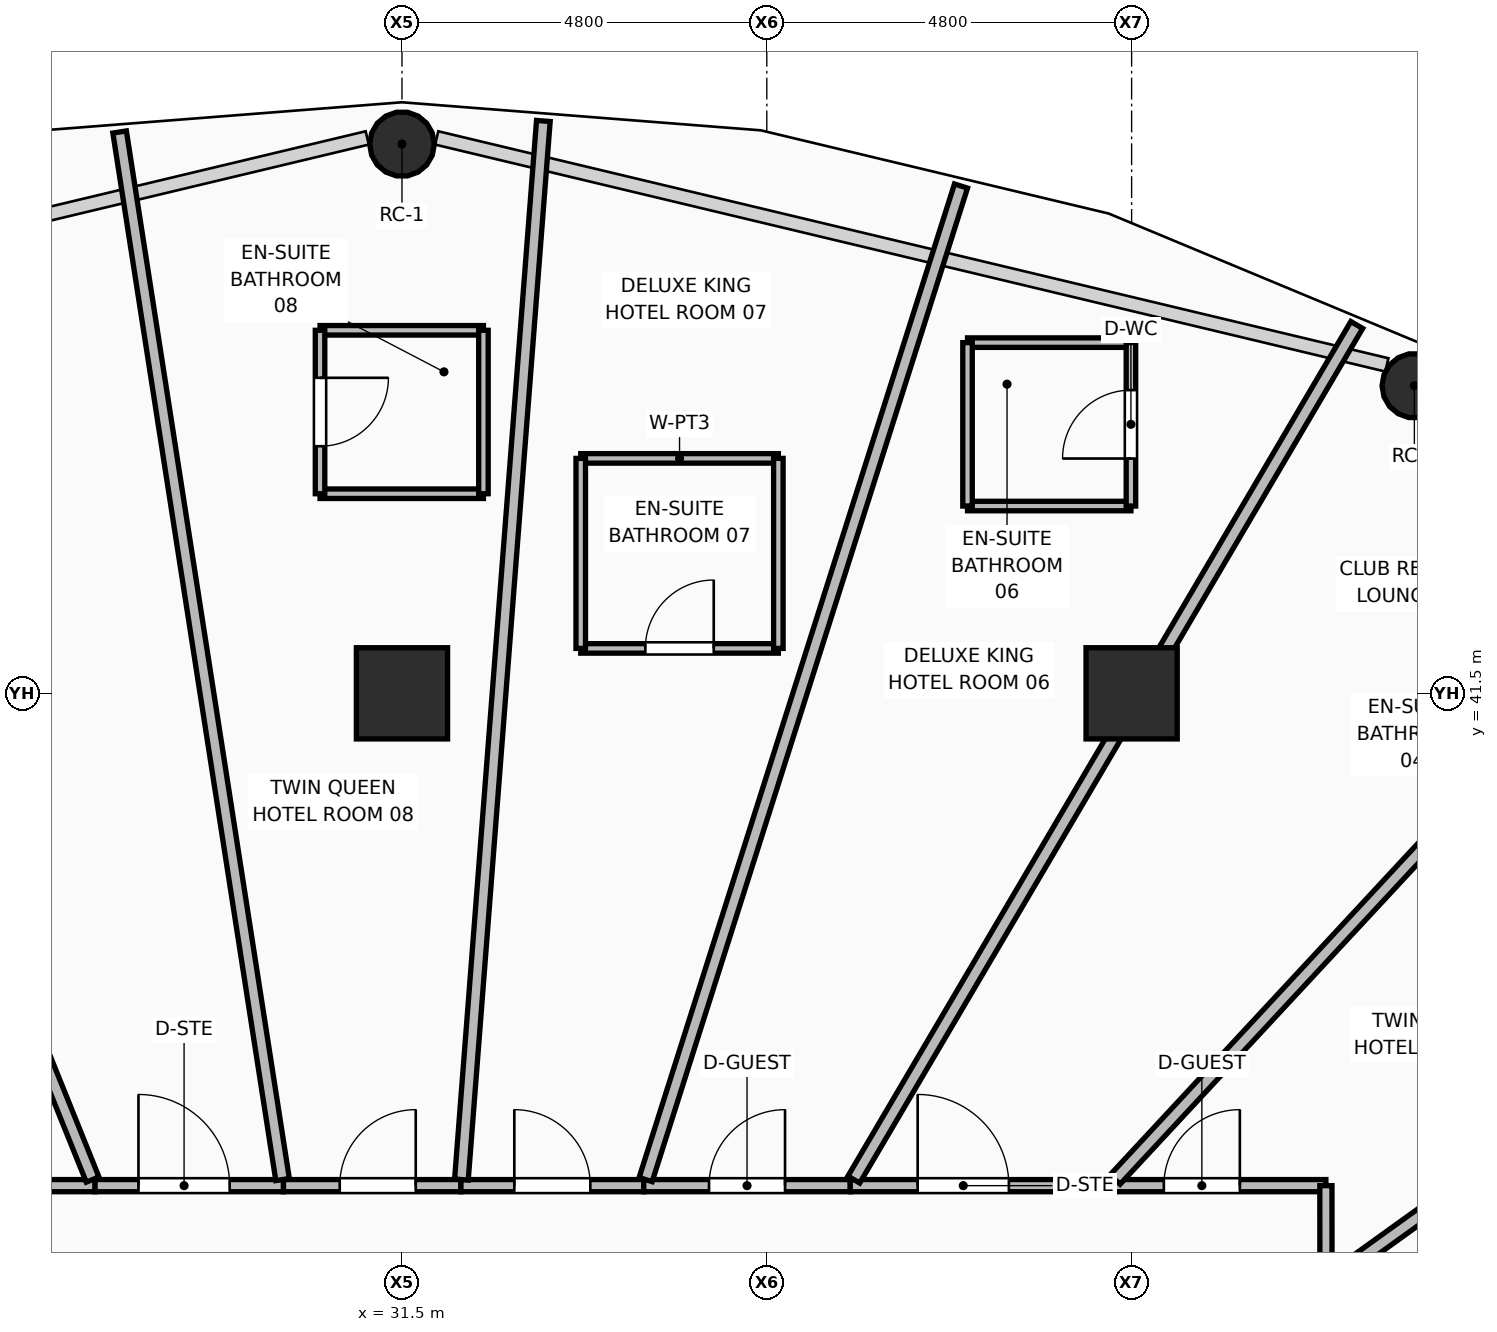
"""IFC4 building model, lengths in metres.
Left out: names, types, materials, properties, quantities, classifications, styles, units other than length and angle.
Written with IfcOpenShell. Run it as: python <this file> out.ifc"""

import sys

from ifc_helpers import new_model, si_unit, direction, frame, frame_2d, origin, origin_2d, place, context, subcontext, project, spatial, rectangle, hollow_rectangle, hollow_circle, extrude, element, fill, save


model = new_model("IFC4")
c1 = context("Model", 3, precision=1e-05, world=origin(), true_north=direction((0.0, 1.0)))
c2 = subcontext(c1, "Body", "Model", "MODEL_VIEW")
j1 = project(units=[si_unit("LENGTHUNIT", "METRE"), si_unit("PLANEANGLEUNIT", "RADIAN")], contexts=[c1])
p1 = place(None, origin())
s1 = spatial("IfcSite", under=j1, at=p1, CompositionType="ELEMENT")
p2 = place(p1, origin())
s2 = spatial("IfcBuilding", under=s1, at=p2, CompositionType="ELEMENT")
p3 = place(p2, frame((0.0, 0.0, 53.25)))
s3 = spatial("IfcBuildingStorey", under=s2, at=p3, CompositionType="ELEMENT", Elevation=53.25)
for number, where, z_axis, x_axis in (
    (1, (31.5, 41.5, 0.0), (0.0, 0.0, 1.0), (1.0, 0.0, 0.0)),
    (2, (41.1, 41.5, 0.0), (0.0, 0.0, 1.0), (1.0, 0.0, 0.0)),
):
    element("IfcColumn", number, at=place(p3, frame(where, z_axis=z_axis, x_axis=x_axis)), inside=s3, PredefinedType="COLUMN", context=c2, shape_type="SweptSolid", body=[
        extrude(hollow_rectangle(XDim=1.2, YDim=1.2, WallThickness=0.045, at=origin_2d()), origin(), (0.0, 0.0, 1.0), 3.75),
    ])
p4 = place(p3, frame((44.82, 45.547, 0.0), z_axis=(0.111309599924, 0.172151708361, 0.978761442985), x_axis=(-0.839754063035, 0.542966954443, 0.0)))
e3 = element("IfcColumn", 3, at=p4, inside=s3, PredefinedType="COLUMN", context=c2, shape_type="SweptSolid", body=[
    extrude(hollow_circle(Radius=0.425, WallThickness=0.04, at=origin_2d()), origin(), (0.0, 0.0, 1.0), 3.647),
])
p5 = place(p3, frame((31.5, 48.726, 0.0), z_axis=(0.0, 0.198976453548, 0.980004270875), x_axis=(-1.0, 0.0, 0.0)))
e4 = element("IfcColumn", 4, at=p5, inside=s3, PredefinedType="COLUMN", context=c2, shape_type="SweptSolid", body=[
    extrude(hollow_circle(Radius=0.425, WallThickness=0.04, at=origin_2d()), origin(), (0.0, 0.0, 1.0), 3.643),
])
p6 = place(p3, frame((24.568, 35.023, 0.0), z_axis=(0.0, 0.0, 1.0), x_axis=(1.0, 0.0, 0.0)))
e5 = element("IfcWall", 5, at=p6, inside=s3, PredefinedType="PARTITIONING", context=c2, shape_type="SweptSolid", body=[
    extrude(rectangle(XDim=2.894, YDim=0.16, at=frame_2d((1.447, 0.0))), origin(), (0.0, 0.0, 1.0), 3.55),
])
p7 = place(p6, frame((0.847, 0.0, 0.0)))
e6 = element("IfcOpeningElement", 6, at=p7, cuts=e5, PredefinedType="OPENING", context=c2, shape_type="SweptSolid", body=[
    extrude(rectangle(XDim=1.2, YDim=2.1, at=frame_2d((0.6, 1.05))), frame((0.0, 0.09, 0.0), z_axis=(0.0, -1.0, 0.0), x_axis=(1.0, 0.0, 0.0)), (0.0, 0.0, 1.0), 0.18),
])
p8 = place(p3, frame((27.462, 35.023, 0.0), z_axis=(0.0, 0.0, 1.0), x_axis=(1.0, 0.0, 0.0)))
e7 = element("IfcWall", 7, at=p8, inside=s3, PredefinedType="PARTITIONING", context=c2, shape_type="SweptSolid", body=[
    extrude(rectangle(XDim=2.479, YDim=0.16, at=frame_2d((1.24, 0.0))), origin(), (0.0, 0.0, 1.0), 3.55),
])
p9 = place(p8, frame((0.571, 0.0, 0.0)))
e8 = element("IfcOpeningElement", 8, at=p9, cuts=e7, PredefinedType="OPENING", context=c2, shape_type="SweptSolid", body=[
    extrude(rectangle(XDim=1.2, YDim=2.1, at=frame_2d((0.6, 1.05))), frame((0.0, 0.09, 0.0), z_axis=(0.0, -1.0, 0.0), x_axis=(1.0, 0.0, 0.0)), (0.0, 0.0, 1.0), 0.18),
])
p10 = place(p3, frame((29.941, 35.023, 0.0), z_axis=(0.0, 0.0, 1.0), x_axis=(1.0, 0.0, 0.0)))
e9 = element("IfcWall", 9, at=p10, inside=s3, PredefinedType="PARTITIONING", context=c2, shape_type="SweptSolid", body=[
    extrude(rectangle(XDim=2.335, YDim=0.16, at=frame_2d((1.167, 0.0))), origin(), (0.0, 0.0, 1.0), 2.928),
])
p11 = place(p10, frame((0.74, 0.0, 0.0)))
e10 = element("IfcOpeningElement", 10, at=p11, cuts=e9, PredefinedType="OPENING", context=c2, shape_type="SweptSolid", body=[
    extrude(rectangle(XDim=1.0, YDim=2.1, at=frame_2d((0.5, 1.05))), frame((0.0, 0.09, 0.0), z_axis=(0.0, -1.0, 0.0), x_axis=(1.0, 0.0, 0.0)), (0.0, 0.0, 1.0), 0.18),
])
p12 = place(p3, frame((32.276, 35.023, 0.0), z_axis=(0.0, 0.0, 1.0), x_axis=(1.0, 0.0, 0.0)))
e11 = element("IfcWall", 11, at=p12, inside=s3, PredefinedType="PARTITIONING", context=c2, shape_type="SweptSolid", body=[
    extrude(rectangle(XDim=2.405, YDim=0.16, at=frame_2d((1.203, 0.0))), origin(), (0.0, 0.0, 1.0), 3.55),
])
p13 = place(p12, frame((0.702, 0.0, 0.0)))
e12 = element("IfcOpeningElement", 12, at=p13, cuts=e11, PredefinedType="OPENING", context=c2, shape_type="SweptSolid", body=[
    extrude(rectangle(XDim=1.0, YDim=2.1, at=frame_2d((0.5, 1.05))), frame((0.0, 0.09, 0.0), z_axis=(0.0, -1.0, 0.0), x_axis=(1.0, 0.0, 0.0)), (0.0, 0.0, 1.0), 0.18),
])
p14 = place(p3, frame((34.681, 35.023, 0.0), z_axis=(0.0, 0.0, 1.0), x_axis=(1.0, 0.0, 0.0)))
e13 = element("IfcWall", 13, at=p14, inside=s3, PredefinedType="PARTITIONING", context=c2, shape_type="SweptSolid", body=[
    extrude(rectangle(XDim=2.717, YDim=0.16, at=frame_2d((1.358, 0.0))), origin(), (0.0, 0.0, 1.0), 3.55),
])
p15 = place(p14, frame((0.859, 0.0, 0.0)))
e14 = element("IfcOpeningElement", 14, at=p15, cuts=e13, PredefinedType="OPENING", context=c2, shape_type="SweptSolid", body=[
    extrude(rectangle(XDim=1.0, YDim=2.1, at=frame_2d((0.5, 1.05))), frame((0.0, 0.09, 0.0), z_axis=(0.0, -1.0, 0.0), x_axis=(1.0, 0.0, 0.0)), (0.0, 0.0, 1.0), 0.18),
])
p16 = place(p3, frame((37.398, 35.023, 0.0), z_axis=(0.0, 0.0, 1.0), x_axis=(1.0, 0.0, 0.0)))
e15 = element("IfcWall", 15, at=p16, inside=s3, PredefinedType="PARTITIONING", context=c2, shape_type="SweptSolid", body=[
    extrude(rectangle(XDim=3.41, YDim=0.16, at=frame_2d((1.705, 0.0))), origin(), (0.0, 0.0, 1.0), 3.55),
])
p17 = place(p16, frame((0.887, 0.0, 0.0)))
e16 = element("IfcOpeningElement", 16, at=p17, cuts=e15, PredefinedType="OPENING", context=c2, shape_type="SweptSolid", body=[
    extrude(rectangle(XDim=1.2, YDim=2.1, at=frame_2d((0.6, 1.05))), frame((0.0, 0.09, 0.0), z_axis=(0.0, -1.0, 0.0), x_axis=(1.0, 0.0, 0.0)), (0.0, 0.0, 1.0), 0.18),
])
p18 = place(p3, frame((40.808, 35.023, 0.0), z_axis=(0.0, 0.0, 1.0), x_axis=(1.0, 0.0, 0.0)))
e17 = element("IfcWall", 17, at=p18, inside=s3, PredefinedType="PARTITIONING", context=c2, shape_type="SweptSolid", body=[
    extrude(rectangle(XDim=2.848, YDim=0.16, at=frame_2d((1.424, 0.0))), origin(), (0.0, 0.0, 1.0), 2.928),
])
p19 = place(p18, frame((0.716, 0.0, 0.0)))
e18 = element("IfcOpeningElement", 18, at=p19, cuts=e17, PredefinedType="OPENING", context=c2, shape_type="SweptSolid", body=[
    extrude(rectangle(XDim=1.0, YDim=2.1, at=frame_2d((0.5, 1.05))), frame((0.0, 0.09, 0.0), z_axis=(0.0, -1.0, 0.0), x_axis=(1.0, 0.0, 0.0)), (0.0, 0.0, 1.0), 0.18),
])
p20 = place(p3, frame((43.656, 35.023, 0.0), z_axis=(0.0, 0.0, 1.0), x_axis=(0.000759445386, -0.999999711621, 0.0)))
e19 = element("IfcWall", 19, at=p20, inside=s3, PredefinedType="PARTITIONING", context=c2, shape_type="SweptSolid", body=[
    extrude(rectangle(XDim=1.286, YDim=0.16, at=frame_2d((0.643, 0.0))), origin(), (0.0, 0.0, 1.0), 3.55),
])
p21 = place(p3, frame((43.753, 30.64, 0.0), z_axis=(0.0, 0.0, 1.0), x_axis=(0.908354532473, 0.418200960466, 0.0)))
e20 = element("IfcWall", 20, at=p21, inside=s3, PredefinedType="PARTITIONING", context=c2, shape_type="SweptSolid", body=[
    extrude(rectangle(XDim=12.934, YDim=0.18, at=frame_2d((6.467, 0.0))), origin(), (0.0, 0.0, 1.0), 2.775),
])
p22 = place(p3, frame((43.753, 33.806, 0.0), z_axis=(0.0, 0.0, 1.0), x_axis=(0.812000044836, 0.583657371397, 0.0)))
e21 = element("IfcWall", 21, at=p22, inside=s3, PredefinedType="PARTITIONING", context=c2, shape_type="SweptSolid", body=[
    extrude(rectangle(XDim=10.852, YDim=0.18, at=frame_2d((5.426, 0.0))), origin(), (0.0, 0.0, 1.0), 2.775),
])
p23 = place(p3, frame((40.882, 35.103, 0.0), z_axis=(0.0, 0.0, 1.0), x_axis=(0.680551186201, 0.732700541122, 0.0)))
e22 = element("IfcWall", 22, at=p23, inside=s3, PredefinedType="PARTITIONING", context=c2, shape_type="SweptSolid", body=[
    extrude(rectangle(XDim=11.601, YDim=0.18, at=frame_2d((5.8, 0.0))), origin(), (0.0, 0.0, 1.0), 2.775),
])
p24 = place(p3, frame((37.445, 35.103, 0.0), z_axis=(0.0, 0.0, 1.0), x_axis=(0.507217216193, 0.861818249747, 0.0)))
e23 = element("IfcWall", 23, at=p24, inside=s3, PredefinedType="PARTITIONING", context=c2, shape_type="SweptSolid", body=[
    extrude(rectangle(XDim=13.046, YDim=0.18, at=frame_2d((6.523, 0.0))), origin(), (0.0, 0.0, 1.0), 2.775),
])
p25 = place(p3, frame((34.706, 35.103, 0.0), z_axis=(0.0, 0.0, 1.0), x_axis=(0.302538571893, 0.953137142555, 0.0)))
e24 = element("IfcWall", 24, at=p25, inside=s3, PredefinedType="PARTITIONING", context=c2, shape_type="SweptSolid", body=[
    extrude(rectangle(XDim=13.714, YDim=0.18, at=frame_2d((6.857, 0.0))), origin(), (0.0, 0.0, 1.0), 2.775),
])
p26 = place(p3, frame((32.282, 35.103, 0.0), z_axis=(0.0, 0.0, 1.0), x_axis=(0.077181650998, 0.997017047371, 0.0)))
e25 = element("IfcWall", 25, at=p26, inside=s3, PredefinedType="PARTITIONING", context=c2, shape_type="SweptSolid", body=[
    extrude(rectangle(XDim=13.969, YDim=0.18, at=frame_2d((6.984, 0.0))), origin(), (0.0, 0.0, 1.0), 2.775),
])
p27 = place(p3, frame((29.929, 35.103, 0.0), z_axis=(0.0, 0.0, 1.0), x_axis=(-0.153719539221, 0.988114519305, 0.0)))
e26 = element("IfcWall", 26, at=p27, inside=s3, PredefinedType="PARTITIONING", context=c2, shape_type="SweptSolid", body=[
    extrude(rectangle(XDim=13.948, YDim=0.18, at=frame_2d((6.974, 0.0))), origin(), (0.0, 0.0, 1.0), 2.775),
])
p28 = place(p3, frame((27.43, 35.103, 0.0), z_axis=(0.0, 0.0, 1.0), x_axis=(-0.373620050468, 0.927581833526, 0.0)))
e27 = element("IfcWall", 27, at=p28, inside=s3, PredefinedType="PARTITIONING", context=c2, shape_type="SweptSolid", body=[
    extrude(rectangle(XDim=13.626, YDim=0.18, at=frame_2d((6.813, 0.0))), origin(), (0.0, 0.0, 1.0), 2.775),
])
for number, where, z_axis, x_axis in (
    (28, (38.941, 43.964, 0.0), (0.0, 0.0, 1.0), (1.0, 0.0, 0.0)),
    (29, (38.941, 46.114, 0.0), (0.0, 0.0, 1.0), (1.0, 0.0, 0.0)),
):
    element("IfcWall", number, at=place(p3, frame(where, z_axis=z_axis, x_axis=x_axis)), inside=s3, PredefinedType="PARTITIONING", context=c2, shape_type="SweptSolid", body=[
        extrude(rectangle(XDim=2.15, YDim=0.125, at=frame_2d((1.075, 0.0))), origin(), (0.0, 0.0, 1.0), 3.55),
    ])
p29 = place(p3, frame((38.941, 43.964, 0.0), z_axis=(0.0, 0.0, 1.0), x_axis=(0.0, 1.0, 0.0)))
e30 = element("IfcWall", 30, at=p29, inside=s3, PredefinedType="PARTITIONING", context=c2, shape_type="SweptSolid", body=[
    extrude(rectangle(XDim=2.15, YDim=0.125, at=frame_2d((1.075, 0.0))), origin(), (0.0, 0.0, 1.0), 3.55),
])
p30 = place(p3, frame((41.091, 43.964, 0.0), z_axis=(0.0, 0.0, 1.0), x_axis=(0.0, 1.0, 0.0)))
e31 = element("IfcWall", 31, at=p30, inside=s3, PredefinedType="PARTITIONING", context=c2, shape_type="SweptSolid", body=[
    extrude(rectangle(XDim=2.15, YDim=0.125, at=frame_2d((1.075, 0.0))), origin(), (0.0, 0.0, 1.0), 3.55),
])
p31 = place(p30, frame((0.625, 0.0, 0.0)))
e32 = element("IfcOpeningElement", 32, at=p31, cuts=e31, PredefinedType="OPENING", context=c2, shape_type="SweptSolid", body=[
    extrude(rectangle(XDim=0.9, YDim=2.1, at=frame_2d((0.45, 1.05))), frame((0.0, 0.073, 0.0), z_axis=(0.0, -1.0, 0.0), x_axis=(1.0, 0.0, 0.0)), (0.0, 0.0, 1.0), 0.145),
])
p32 = place(p3, frame((33.852, 42.091, 0.0), z_axis=(0.0, 0.0, 1.0), x_axis=(1.0, 0.0, 0.0)))
e33 = element("IfcWall", 33, at=p32, inside=s3, PredefinedType="PARTITIONING", context=c2, shape_type="SweptSolid", body=[
    extrude(rectangle(XDim=2.6, YDim=0.125, at=frame_2d((1.3, 0.0))), origin(), (0.0, 0.0, 1.0), 3.55),
])
p33 = place(p32, frame((0.85, 0.0, 0.0)))
e34 = element("IfcOpeningElement", 34, at=p33, cuts=e33, PredefinedType="OPENING", context=c2, shape_type="SweptSolid", body=[
    extrude(rectangle(XDim=0.9, YDim=2.1, at=frame_2d((0.45, 1.05))), frame((0.0, 0.073, 0.0), z_axis=(0.0, -1.0, 0.0), x_axis=(1.0, 0.0, 0.0)), (0.0, 0.0, 1.0), 0.145),
])
p34 = place(p3, frame((33.852, 44.591, 0.0), z_axis=(0.0, 0.0, 1.0), x_axis=(1.0, 0.0, 0.0)))
e35 = element("IfcWall", 35, at=p34, inside=s3, PredefinedType="PARTITIONING", context=c2, shape_type="SweptSolid", body=[
    extrude(rectangle(XDim=2.6, YDim=0.125, at=frame_2d((1.3, 0.0))), origin(), (0.0, 0.0, 1.0), 3.55),
])
for number, where, z_axis, x_axis in (
    (36, (33.852, 42.091, 0.0), (0.0, 0.0, 1.0), (0.0, 1.0, 0.0)),
    (37, (36.452, 42.091, 0.0), (0.0, 0.0, 1.0), (0.0, 1.0, 0.0)),
):
    element("IfcWall", number, at=place(p3, frame(where, z_axis=z_axis, x_axis=x_axis)), inside=s3, PredefinedType="PARTITIONING", context=c2, shape_type="SweptSolid", body=[
        extrude(rectangle(XDim=2.5, YDim=0.125, at=frame_2d((1.25, 0.0))), origin(), (0.0, 0.0, 1.0), 3.55),
    ])
for number, where, z_axis, x_axis in (
    (38, (30.422, 44.126, 0.0), (0.0, 0.0, 1.0), (1.0, 0.0, 0.0)),
    (39, (30.422, 46.276, 0.0), (0.0, 0.0, 1.0), (1.0, 0.0, 0.0)),
):
    element("IfcWall", number, at=place(p3, frame(where, z_axis=z_axis, x_axis=x_axis)), inside=s3, PredefinedType="PARTITIONING", context=c2, shape_type="SweptSolid", body=[
        extrude(rectangle(XDim=2.15, YDim=0.125, at=frame_2d((1.075, 0.0))), origin(), (0.0, 0.0, 1.0), 2.928),
    ])
p35 = place(p3, frame((30.422, 44.126, 0.0), z_axis=(0.0, 0.0, 1.0), x_axis=(0.0, 1.0, 0.0)))
e40 = element("IfcWall", 40, at=p35, inside=s3, PredefinedType="PARTITIONING", context=c2, shape_type="SweptSolid", body=[
    extrude(rectangle(XDim=2.15, YDim=0.125, at=frame_2d((1.075, 0.0))), origin(), (0.0, 0.0, 1.0), 3.55),
])
p36 = place(p35, frame((0.625, 0.0, 0.0)))
e41 = element("IfcOpeningElement", 41, at=p36, cuts=e40, PredefinedType="OPENING", context=c2, shape_type="SweptSolid", body=[
    extrude(rectangle(XDim=0.9, YDim=2.1, at=frame_2d((0.45, 1.05))), frame((0.0, 0.073, 0.0), z_axis=(0.0, -1.0, 0.0), x_axis=(1.0, 0.0, 0.0)), (0.0, 0.0, 1.0), 0.145),
])
p37 = place(p3, frame((32.572, 44.126, 0.0), z_axis=(0.0, 0.0, 1.0), x_axis=(0.0, 1.0, 0.0)))
e42 = element("IfcWall", 42, at=p37, inside=s3, PredefinedType="PARTITIONING", context=c2, shape_type="SweptSolid", body=[
    extrude(rectangle(XDim=2.15, YDim=0.125, at=frame_2d((1.075, 0.0))), origin(), (0.0, 0.0, 1.0), 3.55),
])
p38 = place(p19, origin())
e43 = element("IfcDoor", 43, at=p38, inside=s3, OperationType="SINGLE_SWING_RIGHT", PredefinedType="DOOR", context=c2, shape_type="SweptSolid", body=[
    extrude(rectangle(XDim=1.0, YDim=2.1, at=frame_2d((0.5, 1.05))), frame((0.0, 0.025, 0.0), z_axis=(0.0, -1.0, 0.0), x_axis=(1.0, 0.0, 0.0)), (0.0, 0.0, 1.0), 0.05),
])
fill(e18, e43)
p39 = place(p17, origin())
e44 = element("IfcDoor", 44, at=p39, inside=s3, OperationType="SINGLE_SWING_LEFT", PredefinedType="DOOR", context=c2, shape_type="SweptSolid", body=[
    extrude(rectangle(XDim=1.2, YDim=2.1, at=frame_2d((0.6, 1.05))), frame((0.0, 0.025, 0.0), z_axis=(0.0, -1.0, 0.0), x_axis=(1.0, 0.0, 0.0)), (0.0, 0.0, 1.0), 0.05),
])
fill(e16, e44)
p40 = place(p31, origin())
e45 = element("IfcDoor", 45, at=p40, inside=s3, OperationType="SINGLE_SWING_LEFT", PredefinedType="DOOR", context=c2, shape_type="SweptSolid", body=[
    extrude(rectangle(XDim=0.9, YDim=2.1, at=frame_2d((0.45, 1.05))), frame((0.0, 0.025, 0.0), z_axis=(0.0, -1.0, 0.0), x_axis=(1.0, 0.0, 0.0)), (0.0, 0.0, 1.0), 0.05),
])
fill(e32, e45)
p41 = place(p15, origin())
e46 = element("IfcDoor", 46, at=p41, inside=s3, OperationType="SINGLE_SWING_RIGHT", PredefinedType="DOOR", context=c2, shape_type="SweptSolid", body=[
    extrude(rectangle(XDim=1.0, YDim=2.1, at=frame_2d((0.5, 1.05))), frame((0.0, 0.025, 0.0), z_axis=(0.0, -1.0, 0.0), x_axis=(1.0, 0.0, 0.0)), (0.0, 0.0, 1.0), 0.05),
])
fill(e14, e46)
p42 = place(p33, origin())
e47 = element("IfcDoor", 47, at=p42, inside=s3, OperationType="SINGLE_SWING_RIGHT", PredefinedType="DOOR", context=c2, shape_type="SweptSolid", body=[
    extrude(rectangle(XDim=0.9, YDim=2.1, at=frame_2d((0.45, 1.05))), frame((0.0, 0.025, 0.0), z_axis=(0.0, -1.0, 0.0), x_axis=(1.0, 0.0, 0.0)), (0.0, 0.0, 1.0), 0.05),
])
fill(e34, e47)
p43 = place(p13, origin())
e48 = element("IfcDoor", 48, at=p43, inside=s3, OperationType="SINGLE_SWING_LEFT", PredefinedType="DOOR", context=c2, shape_type="SweptSolid", body=[
    extrude(rectangle(XDim=1.0, YDim=2.1, at=frame_2d((0.5, 1.05))), frame((0.0, 0.025, 0.0), z_axis=(0.0, -1.0, 0.0), x_axis=(1.0, 0.0, 0.0)), (0.0, 0.0, 1.0), 0.05),
])
fill(e12, e48)
p44 = place(p36, frame((0.9, 0.0, 0.0), z_axis=(0.0, 0.0, 1.0), x_axis=(-1.0, 0.0, 0.0)))
e49 = element("IfcDoor", 49, at=p44, inside=s3, OperationType="SINGLE_SWING_LEFT", PredefinedType="DOOR", context=c2, shape_type="SweptSolid", body=[
    extrude(rectangle(XDim=0.9, YDim=2.1, at=frame_2d((0.45, 1.05))), frame((0.0, 0.025, 0.0), z_axis=(0.0, -1.0, 0.0), x_axis=(1.0, 0.0, 0.0)), (0.0, 0.0, 1.0), 0.05),
])
fill(e41, e49)
p45 = place(p11, origin())
e50 = element("IfcDoor", 50, at=p45, inside=s3, OperationType="SINGLE_SWING_RIGHT", PredefinedType="DOOR", context=c2, shape_type="SweptSolid", body=[
    extrude(rectangle(XDim=1.0, YDim=2.1, at=frame_2d((0.5, 1.05))), frame((0.0, 0.025, 0.0), z_axis=(0.0, -1.0, 0.0), x_axis=(1.0, 0.0, 0.0)), (0.0, 0.0, 1.0), 0.05),
])
fill(e10, e50)
p46 = place(p9, origin())
e51 = element("IfcDoor", 51, at=p46, inside=s3, OperationType="SINGLE_SWING_LEFT", PredefinedType="DOOR", context=c2, shape_type="SweptSolid", body=[
    extrude(rectangle(XDim=1.2, YDim=2.1, at=frame_2d((0.6, 1.05))), frame((0.0, 0.025, 0.0), z_axis=(0.0, -1.0, 0.0), x_axis=(1.0, 0.0, 0.0)), (0.0, 0.0, 1.0), 0.05),
])
fill(e8, e51)
save(model, sys.argv[1])
